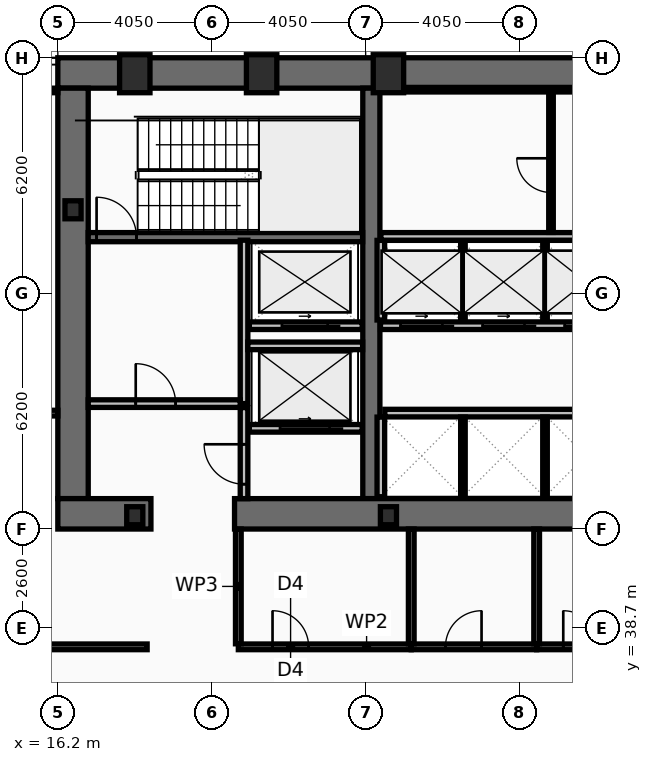
"""IFC4 building model, lengths in metres.
Left out: names, types, materials, properties, quantities, classifications, styles, units other than length and angle.
Written with IfcOpenShell. Run it as: python <this file> out.ifc"""

import sys

from ifc_helpers import new_model, si_unit, direction, frame, frame_2d, origin, origin_2d, place, context, subcontext, project, spatial, rectangle, hollow_rectangle, i_section, extrude, element, fill, save


model = new_model("IFC4")
c1 = context("Model", 3, precision=1e-05, world=origin(), true_north=direction((0.0, 1.0)))
c2 = subcontext(c1, "Body", "Model", "MODEL_VIEW")
j1 = project(units=[si_unit("LENGTHUNIT", "METRE"), si_unit("PLANEANGLEUNIT", "RADIAN")], contexts=[c1])
p1 = place(None, origin())
s1 = spatial("IfcSite", under=j1, at=p1, CompositionType="ELEMENT")
p2 = place(p1, origin())
s2 = spatial("IfcBuilding", under=s1, at=p2, CompositionType="ELEMENT")
p3 = place(p2, frame((0.0, 0.0, 53.8)))
s3 = spatial("IfcBuildingStorey", under=s2, at=p3, CompositionType="ELEMENT", Elevation=53.8)
p4 = place(p3, frame((16.2, 53.3, 0.0), z_axis=(0.0, 0.0, 1.0), x_axis=(1.0, 0.0, 0.0)))
e1 = element("IfcWall", 1, at=p4, inside=s3, PredefinedType="SHEAR", context=c2, shape_type="SweptSolid", body=[
    extrude(rectangle(XDim=40.5, YDim=0.8, at=frame_2d((20.25, 0.0))), origin(), (0.0, 0.0, 1.0), 3.82),
])
p5 = place(p3, frame((16.6, 42.1, 0.0), z_axis=(0.0, 0.0, 1.0), x_axis=(0.0, 1.0, 0.0)))
e2 = element("IfcWall", 2, at=p5, inside=s3, PredefinedType="SHEAR", context=c2, shape_type="SweptSolid", body=[
    extrude(rectangle(XDim=10.8, YDim=0.8, at=frame_2d((5.4, 0.0))), origin(), (0.0, 0.0, 1.0), 3.82),
])
p6 = place(p3, frame((24.45, 42.1, 0.0), z_axis=(0.0, 0.0, 1.0), x_axis=(0.0, 1.0, 0.0)))
e3 = element("IfcWall", 3, at=p6, inside=s3, PredefinedType="SHEAR", context=c2, shape_type="SweptSolid", body=[
    extrude(rectangle(XDim=10.8, YDim=0.45, at=frame_2d((5.4, 0.0))), origin(), (0.0, 0.0, 1.0), 3.82),
])
p7 = place(p3, frame((18.65, 41.7, 0.0), z_axis=(0.0, 0.0, 1.0), x_axis=(-1.0, 0.0, 0.0)))
e4 = element("IfcWall", 4, at=p7, inside=s3, PredefinedType="SHEAR", context=c2, shape_type="SweptSolid", body=[
    extrude(rectangle(XDim=2.45, YDim=0.8, at=frame_2d((1.225, 0.0))), origin(), (0.0, 0.0, 1.0), 3.82),
])
p8 = place(p3, frame((32.3, 41.7, 0.0), z_axis=(0.0, 0.0, 1.0), x_axis=(-1.0, 0.0, 0.0)))
e5 = element("IfcWall", 5, at=p8, inside=s3, PredefinedType="SHEAR", context=c2, shape_type="SweptSolid", body=[
    extrude(rectangle(XDim=11.45, YDim=0.8, at=frame_2d((5.725, 0.0))), origin(), (0.0, 0.0, 1.0), 3.82),
])
p9 = place(p3, frame((17.0, 48.98, 0.0), z_axis=(0.0, 0.0, 1.0), x_axis=(1.0, 0.0, 0.0)))
e6 = element("IfcWall", 6, at=p9, inside=s3, PredefinedType="SHEAR", context=c2, shape_type="SweptSolid", body=[
    extrude(rectangle(XDim=7.22, YDim=0.24, at=frame_2d((3.61, 0.0))), origin(), (0.0, 0.0, 1.0), 3.82),
])
p10 = place(p9, frame((0.22, 0.0, 0.0)))
e7 = element("IfcOpeningElement", 7, at=p10, cuts=e6, PredefinedType="OPENING", context=c2, shape_type="SweptSolid", body=[
    extrude(rectangle(XDim=1.05, YDim=2.15, at=frame_2d((0.525, 1.075))), frame((0.0, 0.13, 0.0), z_axis=(0.0, -1.0, 0.0), x_axis=(1.0, 0.0, 0.0)), (0.0, 0.0, 1.0), 0.26),
])
for number, where, z_axis, x_axis in (
    (8, (18.225, 53.28, 0.0), (0.0, 0.0, 1.0), (1.0, 0.0, 0.0)),
    (9, (21.562, 53.28, 0.0), (0.0, 0.0, 1.0), (1.0, 0.0, 0.0)),
    (10, (24.9, 53.28, 0.0), (0.0, 0.0, 1.0), (1.0, 0.0, 0.0)),
):
    element("IfcColumn", number, at=place(p3, frame(where, z_axis=z_axis, x_axis=x_axis)), inside=s3, PredefinedType="COLUMN", context=c2, shape_type="SweptSolid", body=[
        extrude(hollow_rectangle(XDim=0.8, YDim=1.0, WallThickness=0.055, at=origin_2d()), origin(), (0.0, 0.0, 1.0), 4.0),
    ])
for number, where, z_axis, x_axis in (
    (11, (16.6, 49.7, 0.0), (0.0, 0.0, 1.0), (1.0, 0.0, 0.0)),
    (12, (18.225, 41.65, 0.0), (0.0, 0.0, 1.0), (1.0, 0.0, 0.0)),
    (13, (24.9, 41.65, 0.0), (0.0, 0.0, 1.0), (1.0, 0.0, 0.0)),
):
    element("IfcColumn", number, at=place(p3, frame(where, z_axis=z_axis, x_axis=x_axis)), inside=s3, PredefinedType="COLUMN", context=c2, shape_type="SweptSolid", body=[
        extrude(i_section(OverallWidth=0.424, OverallDepth=0.474, WebThickness=0.048, FlangeThickness=0.077, at=origin_2d()), origin(), (0.0, 0.0, 1.0), 4.0),
    ])
p11 = place(p3, frame((24.21, 43.95, 0.0), z_axis=(0.0, 0.0, 1.0), x_axis=(-1.0, 0.0, 0.0)))
e14 = element("IfcWall", 14, at=p11, inside=s3, PredefinedType="PARTITIONING", context=c2, shape_type="SweptSolid", body=[
    extrude(rectangle(XDim=2.97, YDim=0.2, at=frame_2d((1.485, 0.0))), origin(), (0.0, 0.0, 1.0), 3.82),
])
p12 = place(p11, frame((0.86, 0.0, 0.0)))
e15 = element("IfcOpeningElement", 15, at=p12, cuts=e14, PredefinedType="OPENING", context=c2, shape_type="SweptSolid", body=[
    extrude(rectangle(XDim=1.3, YDim=2.18, at=frame_2d((0.65, 1.09))), frame((0.0, 0.11, 0.0), z_axis=(0.0, -1.0, 0.0), x_axis=(1.0, 0.0, 0.0)), (0.0, 0.0, 1.0), 0.22),
])
p13 = place(p3, frame((24.21, 46.65, 0.0), z_axis=(0.0, 0.0, 1.0), x_axis=(-1.0, 0.0, 0.0)))
e16 = element("IfcWall", 16, at=p13, inside=s3, PredefinedType="PARTITIONING", context=c2, shape_type="SweptSolid", body=[
    extrude(rectangle(XDim=2.97, YDim=0.2, at=frame_2d((1.485, 0.0))), origin(), (0.0, 0.0, 1.0), 3.82),
])
p14 = place(p13, frame((0.91, 0.0, 0.0)))
e17 = element("IfcOpeningElement", 17, at=p14, cuts=e16, PredefinedType="OPENING", context=c2, shape_type="SweptSolid", body=[
    extrude(rectangle(XDim=1.2, YDim=2.18, at=frame_2d((0.6, 1.09))), frame((0.0, 0.11, 0.0), z_axis=(0.0, -1.0, 0.0), x_axis=(1.0, 0.0, 0.0)), (0.0, 0.0, 1.0), 0.22),
])
p15 = place(p3, frame((31.22, 46.65, 0.0), z_axis=(0.0, 0.0, 1.0), x_axis=(-1.0, 0.0, 0.0)))
e18 = element("IfcWall", 18, at=p15, inside=s3, PredefinedType="PARTITIONING", context=c2, shape_type="SweptSolid", body=[
    extrude(rectangle(XDim=6.53, YDim=0.2, at=frame_2d((3.265, 0.0))), origin(), (0.0, 0.0, 1.0), 3.82),
])
p16 = place(p15, frame((4.9, 0.0, 0.0)))
e19 = element("IfcOpeningElement", 19, at=p16, cuts=e18, PredefinedType="OPENING", context=c2, shape_type="SweptSolid", body=[
    extrude(rectangle(XDim=1.1, YDim=2.18, at=frame_2d((0.55, 1.09))), frame((0.0, 0.11, 0.0), z_axis=(0.0, -1.0, 0.0), x_axis=(1.0, 0.0, 0.0)), (0.0, 0.0, 1.0), 0.22),
])
p17 = place(p15, frame((2.74, 0.0, 0.0)))
e20 = element("IfcOpeningElement", 20, at=p17, cuts=e18, PredefinedType="OPENING", context=c2, shape_type="SweptSolid", body=[
    extrude(rectangle(XDim=1.1, YDim=2.18, at=frame_2d((0.55, 1.09))), frame((0.0, 0.11, 0.0), z_axis=(0.0, -1.0, 0.0), x_axis=(1.0, 0.0, 0.0)), (0.0, 0.0, 1.0), 0.22),
])
p18 = place(p15, frame((0.58, 0.0, 0.0)))
e21 = element("IfcOpeningElement", 21, at=p18, cuts=e18, PredefinedType="OPENING", context=c2, shape_type="SweptSolid", body=[
    extrude(rectangle(XDim=1.1, YDim=2.18, at=frame_2d((0.55, 1.09))), frame((0.0, 0.11, 0.0), z_axis=(0.0, -1.0, 0.0), x_axis=(1.0, 0.0, 0.0)), (0.0, 0.0, 1.0), 0.22),
])
p19 = place(p3, frame((21.1, 44.6, 0.0), z_axis=(0.0, 0.0, 1.0), x_axis=(0.0, 1.0, 0.0)))
e22 = element("IfcWall", 22, at=p19, inside=s3, PredefinedType="PARTITIONING", context=c2, shape_type="SweptSolid", body=[
    extrude(rectangle(XDim=4.3, YDim=0.2, at=frame_2d((2.15, 0.0))), origin(), (0.0, 0.0, 1.0), 3.82),
])
p20 = place(p3, frame((17.0, 44.6, 0.0), z_axis=(0.0, 0.0, 1.0), x_axis=(1.0, 0.0, 0.0)))
e23 = element("IfcWall", 23, at=p20, inside=s3, PredefinedType="PARTITIONING", context=c2, shape_type="SweptSolid", body=[
    extrude(rectangle(XDim=4.0, YDim=0.2, at=frame_2d((2.0, 0.0))), origin(), (0.0, 0.0, 1.0), 3.82),
])
p21 = place(p20, frame((1.25, 0.0, 0.0)))
e24 = element("IfcOpeningElement", 24, at=p21, cuts=e23, PredefinedType="OPENING", context=c2, shape_type="SweptSolid", body=[
    extrude(rectangle(XDim=1.05, YDim=2.15, at=frame_2d((0.525, 1.075))), frame((0.0, 0.11, 0.0), z_axis=(0.0, -1.0, 0.0), x_axis=(1.0, 0.0, 0.0)), (0.0, 0.0, 1.0), 0.22),
])
p22 = place(p3, frame((21.2, 46.12, 0.0), z_axis=(0.0, 0.0, 1.0), x_axis=(1.0, 0.0, 0.0)))
e25 = element("IfcWall", 25, at=p22, inside=s3, PredefinedType="PARTITIONING", context=c2, shape_type="SweptSolid", body=[
    extrude(rectangle(XDim=3.02, YDim=0.2, at=frame_2d((1.51, 0.0))), origin(), (0.0, 0.0, 1.0), 3.82),
])
p23 = place(p3, frame((21.1, 42.1, 0.0), z_axis=(0.0, 0.0, 1.0), x_axis=(0.0, 1.0, 0.0)))
e26 = element("IfcWall", 26, at=p23, inside=s3, PredefinedType="PARTITIONING", context=c2, shape_type="SweptSolid", body=[
    extrude(rectangle(XDim=2.395, YDim=0.2, at=frame_2d((1.198, 0.0))), origin(), (0.0, 0.0, 1.0), 3.82),
])
p24 = place(p23, frame((0.38, 0.0, 0.0)))
e27 = element("IfcOpeningElement", 27, at=p24, cuts=e26, PredefinedType="OPENING", context=c2, shape_type="SweptSolid", body=[
    extrude(rectangle(XDim=1.05, YDim=2.15, at=frame_2d((0.525, 1.075))), frame((0.0, 0.11, 0.0), z_axis=(0.0, -1.0, 0.0), x_axis=(1.0, 0.0, 0.0)), (0.0, 0.0, 1.0), 0.22),
])
p25 = place(p3, frame((24.7, 46.8, 0.0), z_axis=(0.0, 0.0, 1.0), x_axis=(0.0, 1.0, 0.0)))
e28 = element("IfcWall", 28, at=p25, inside=s3, PredefinedType="PARTITIONING", context=c2, shape_type="SweptSolid", body=[
    extrude(rectangle(XDim=2.095, YDim=0.2, at=frame_2d((1.047, 0.0))), origin(), (0.0, 0.0, 1.0), 3.82),
])
for number, where, z_axis, x_axis in (
    (29, (26.86, 46.8, 0.0), (0.0, 0.0, 1.0), (0.0, 1.0, 0.0)),
    (30, (29.02, 46.8, 0.0), (0.0, 0.0, 1.0), (0.0, 1.0, 0.0)),
):
    element("IfcWall", number, at=place(p3, frame(where, z_axis=z_axis, x_axis=x_axis)), inside=s3, PredefinedType="PARTITIONING", context=c2, shape_type="SweptSolid", body=[
        extrude(rectangle(XDim=2.095, YDim=0.12, at=frame_2d((1.047, 0.0))), origin(), (0.0, 0.0, 1.0), 3.82),
    ])
p26 = place(p3, frame((24.805, 44.35, 0.0), z_axis=(0.0, 0.0, 1.0), x_axis=(1.0, 0.0, 0.0)))
e31 = element("IfcWall", 31, at=p26, inside=s3, PredefinedType="PARTITIONING", context=c2, shape_type="SweptSolid", body=[
    extrude(rectangle(XDim=6.27, YDim=0.2, at=frame_2d((3.135, 0.0))), origin(), (0.0, 0.0, 1.0), 3.82),
])
p27 = place(p3, frame((24.7, 42.15, 0.0), z_axis=(0.0, 0.0, 1.0), x_axis=(0.0, 1.0, 0.0)))
e32 = element("IfcWall", 32, at=p27, inside=s3, PredefinedType="PARTITIONING", context=c2, shape_type="SweptSolid", body=[
    extrude(rectangle(XDim=2.095, YDim=0.2, at=frame_2d((1.048, 0.0))), origin(), (0.0, 0.0, 1.0), 3.82),
])
for number, where, z_axis, x_axis in (
    (33, (26.86, 42.15, 0.0), (0.0, 0.0, 1.0), (0.0, 1.0, 0.0)),
    (34, (29.02, 42.15, 0.0), (0.0, 0.0, 1.0), (0.0, 1.0, 0.0)),
):
    element("IfcWall", number, at=place(p3, frame(where, z_axis=z_axis, x_axis=x_axis)), inside=s3, PredefinedType="PARTITIONING", context=c2, shape_type="SweptSolid", body=[
        extrude(rectangle(XDim=2.095, YDim=0.12, at=frame_2d((1.048, 0.0))), origin(), (0.0, 0.0, 1.0), 3.82),
    ])
p28 = place(p3, frame((24.7, 52.86, 0.0), z_axis=(0.0, 0.0, 1.0), x_axis=(1.0, 0.0, 0.0)))
e35 = element("IfcWall", 35, at=p28, inside=s3, PredefinedType="PARTITIONING", context=c2, shape_type="SweptSolid", body=[
    extrude(rectangle(XDim=7.72, YDim=0.12, at=frame_2d((3.86, 0.0))), origin(), (0.0, 0.0, 1.0), 3.82),
])
p29 = place(p3, frame((24.7, 49.0, 0.0), z_axis=(0.0, 0.0, 1.0), x_axis=(1.0, 0.0, 0.0)))
e36 = element("IfcWall", 36, at=p29, inside=s3, PredefinedType="PARTITIONING", context=c2, shape_type="SweptSolid", body=[
    extrude(rectangle(XDim=7.72, YDim=0.2, at=frame_2d((3.86, 0.0))), origin(), (0.0, 0.0, 1.0), 3.82),
])
p30 = place(p29, frame((6.56, 0.0, 0.0)))
e37 = element("IfcOpeningElement", 37, at=p30, cuts=e36, PredefinedType="OPENING", context=c2, shape_type="SweptSolid", body=[
    extrude(rectangle(XDim=0.95, YDim=2.1, at=frame_2d((0.475, 1.05))), frame((0.0, 0.11, 0.0), z_axis=(0.0, -1.0, 0.0), x_axis=(1.0, 0.0, 0.0)), (0.0, 0.0, 1.0), 0.22),
])
p31 = place(p3, frame((29.177, 49.105, 0.0), z_axis=(0.0, 0.0, 1.0), x_axis=(0.0, 1.0, 0.0)))
e38 = element("IfcWall", 38, at=p31, inside=s3, PredefinedType="PARTITIONING", context=c2, shape_type="SweptSolid", body=[
    extrude(rectangle(XDim=3.69, YDim=0.12, at=frame_2d((1.845, 0.0))), origin(), (0.0, 0.0, 1.0), 3.82),
])
p32 = place(p31, frame((1.05, 0.0, 0.0)))
e39 = element("IfcOpeningElement", 39, at=p32, cuts=e38, PredefinedType="OPENING", context=c2, shape_type="SweptSolid", body=[
    extrude(rectangle(XDim=0.9, YDim=2.05, at=frame_2d((0.45, 1.025))), frame((0.0, 0.07, 0.0), z_axis=(0.0, -1.0, 0.0), x_axis=(1.0, 0.0, 0.0)), (0.0, 0.0, 1.0), 0.14),
])
p33 = place(p3, frame((20.95, 38.2, 0.0), z_axis=(0.0, 0.0, 1.0), x_axis=(1.0, 0.0, 0.0)))
e40 = element("IfcWall", 40, at=p33, inside=s3, PredefinedType="PARTITIONING", context=c2, shape_type="SweptSolid", body=[
    extrude(rectangle(XDim=4.55, YDim=0.15, at=frame_2d((2.275, 0.0))), origin(), (0.0, 0.0, 1.0), 3.01),
])
p34 = place(p33, frame((0.9, 0.0, 0.0)))
e41 = element("IfcOpeningElement", 41, at=p34, cuts=e40, PredefinedType="OPENING", context=c2, shape_type="SweptSolid", body=[
    extrude(rectangle(XDim=0.95, YDim=2.05, at=frame_2d((0.475, 1.025))), frame((0.0, 0.085, 0.0), z_axis=(0.0, -1.0, 0.0), x_axis=(1.0, 0.0, 0.0)), (0.0, 0.0, 1.0), 0.17),
])
p35 = place(p3, frame((25.5, 38.2, 0.0), z_axis=(0.0, 0.0, 1.0), x_axis=(1.0, 0.0, 0.0)))
e42 = element("IfcWall", 42, at=p35, inside=s3, PredefinedType="PARTITIONING", context=c2, shape_type="SweptSolid", body=[
    extrude(rectangle(XDim=3.3, YDim=0.15, at=frame_2d((1.65, 0.0))), origin(), (0.0, 0.0, 1.0), 3.82),
])
p36 = place(p35, frame((0.9, 0.0, 0.0)))
e43 = element("IfcOpeningElement", 43, at=p36, cuts=e42, PredefinedType="OPENING", context=c2, shape_type="SweptSolid", body=[
    extrude(rectangle(XDim=0.95, YDim=2.05, at=frame_2d((0.475, 1.025))), frame((0.0, 0.085, 0.0), z_axis=(0.0, -1.0, 0.0), x_axis=(1.0, 0.0, 0.0)), (0.0, 0.0, 1.0), 0.17),
])
p37 = place(p3, frame((28.8, 38.2, 0.0), z_axis=(0.0, 0.0, 1.0), x_axis=(1.0, 0.0, 0.0)))
e44 = element("IfcWall", 44, at=p37, inside=s3, PredefinedType="PARTITIONING", context=c2, shape_type="SweptSolid", body=[
    extrude(rectangle(XDim=3.38, YDim=0.15, at=frame_2d((1.69, 0.0))), origin(), (0.0, 0.0, 1.0), 3.01),
])
p38 = place(p37, frame((0.7, 0.0, 0.0)))
e45 = element("IfcOpeningElement", 45, at=p38, cuts=e44, PredefinedType="OPENING", context=c2, shape_type="SweptSolid", body=[
    extrude(rectangle(XDim=0.95, YDim=2.05, at=frame_2d((0.475, 1.025))), frame((0.0, 0.085, 0.0), z_axis=(0.0, -1.0, 0.0), x_axis=(1.0, 0.0, 0.0)), (0.0, 0.0, 1.0), 0.17),
])
for number, where, z_axis, x_axis in (
    (46, (20.95, 38.28, 0.0), (0.0, 0.0, 1.0), (0.0, 1.0, 0.0)),
    (47, (25.5, 38.28, 0.0), (0.0, 0.0, 1.0), (0.0, 1.0, 0.0)),
    (48, (28.8, 38.28, 0.0), (0.0, 0.0, 1.0), (0.0, 1.0, 0.0)),
):
    element("IfcWall", number, at=place(p3, frame(where, z_axis=z_axis, x_axis=x_axis)), inside=s3, PredefinedType="PARTITIONING", context=c2, shape_type="SweptSolid", body=[
        extrude(rectangle(XDim=3.02, YDim=0.15, at=frame_2d((1.51, 0.0))), origin(), (0.0, 0.0, 1.0), 3.82),
    ])
p39 = place(p3, frame((2.03, 38.2, 0.0), z_axis=(0.0, 0.0, 1.0), x_axis=(1.0, 0.0, 0.0)))
e49 = element("IfcWall", 49, at=p39, inside=s3, PredefinedType="PARTITIONING", context=c2, shape_type="SweptSolid", body=[
    extrude(rectangle(XDim=16.52, YDim=0.15, at=frame_2d((8.26, 0.0))), origin(), (0.0, 0.0, 1.0), 3.01),
])
p40 = place(p39, frame((12.32, 0.0, 0.0)))
e50 = element("IfcOpeningElement", 50, at=p40, cuts=e49, PredefinedType="OPENING", context=c2, shape_type="SweptSolid", body=[
    extrude(rectangle(XDim=0.95, YDim=2.05, at=frame_2d((0.475, 1.025))), frame((0.0, 0.085, 0.0), z_axis=(0.0, -1.0, 0.0), x_axis=(1.0, 0.0, 0.0)), (0.0, 0.0, 1.0), 0.17),
])
p41 = place(p3, frame((2.095, 44.35, 0.0), z_axis=(0.0, 0.0, 1.0), x_axis=(1.0, 0.0, 0.0)))
e51 = element("IfcWall", 51, at=p41, inside=s3, PredefinedType="PARTITIONING", context=c2, shape_type="SweptSolid", body=[
    extrude(rectangle(XDim=14.105, YDim=0.15, at=frame_2d((7.052, 0.0))), origin(), (0.0, 0.0, 1.0), 3.16),
])
p42 = place(p41, frame((12.32, 0.0, 0.0)))
e52 = element("IfcOpeningElement", 52, at=p42, cuts=e51, PredefinedType="OPENING", context=c2, shape_type="SweptSolid", body=[
    extrude(rectangle(XDim=0.9, YDim=2.05, at=frame_2d((0.45, 1.025))), frame((0.0, 0.085, 0.0), z_axis=(0.0, -1.0, 0.0), x_axis=(1.0, 0.0, 0.0)), (0.0, 0.0, 1.0), 0.17),
])
p43 = place(p3, frame((2.095, 52.84, 0.0), z_axis=(0.0, 0.0, 1.0), x_axis=(1.0, 0.0, 0.0)))
e53 = element("IfcWall", 53, at=p43, inside=s3, PredefinedType="PARTITIONING", context=c2, shape_type="SweptSolid", body=[
    extrude(rectangle(XDim=14.105, YDim=0.12, at=frame_2d((7.052, 0.0))), origin(), (0.0, 0.0, 1.0), 3.82),
])
p44 = place(p10, origin())
e54 = element("IfcDoor", 54, at=p44, inside=s3, OperationType="SINGLE_SWING_LEFT", PredefinedType="DOOR", context=c2, shape_type="SweptSolid", body=[
    extrude(rectangle(XDim=1.05, YDim=2.15, at=frame_2d((0.525, 1.075))), frame((0.0, 0.025, 0.0), z_axis=(0.0, -1.0, 0.0), x_axis=(1.0, 0.0, 0.0)), (0.0, 0.0, 1.0), 0.05),
])
fill(e7, e54)
p45 = place(p12, origin())
e55 = element("IfcDoor", 55, at=p45, inside=s3, OperationType="SLIDING_TO_LEFT", PredefinedType="DOOR", context=c2, shape_type="SweptSolid", body=[
    extrude(rectangle(XDim=1.3, YDim=2.18, at=frame_2d((0.65, 1.09))), frame((0.0, 0.025, 0.0), z_axis=(0.0, -1.0, 0.0), x_axis=(1.0, 0.0, 0.0)), (0.0, 0.0, 1.0), 0.05),
])
fill(e15, e55)
p46 = place(p14, origin())
e56 = element("IfcDoor", 56, at=p46, inside=s3, OperationType="SLIDING_TO_LEFT", PredefinedType="DOOR", context=c2, shape_type="SweptSolid", body=[
    extrude(rectangle(XDim=1.2, YDim=2.18, at=frame_2d((0.6, 1.09))), frame((0.0, 0.025, 0.0), z_axis=(0.0, -1.0, 0.0), x_axis=(1.0, 0.0, 0.0)), (0.0, 0.0, 1.0), 0.05),
])
fill(e17, e56)
p47 = place(p16, origin())
e57 = element("IfcDoor", 57, at=p47, inside=s3, OperationType="SLIDING_TO_LEFT", PredefinedType="DOOR", context=c2, shape_type="SweptSolid", body=[
    extrude(rectangle(XDim=1.1, YDim=2.18, at=frame_2d((0.55, 1.09))), frame((0.0, 0.025, 0.0), z_axis=(0.0, -1.0, 0.0), x_axis=(1.0, 0.0, 0.0)), (0.0, 0.0, 1.0), 0.05),
])
fill(e19, e57)
p48 = place(p17, origin())
e58 = element("IfcDoor", 58, at=p48, inside=s3, OperationType="SLIDING_TO_LEFT", PredefinedType="DOOR", context=c2, shape_type="SweptSolid", body=[
    extrude(rectangle(XDim=1.1, YDim=2.18, at=frame_2d((0.55, 1.09))), frame((0.0, 0.025, 0.0), z_axis=(0.0, -1.0, 0.0), x_axis=(1.0, 0.0, 0.0)), (0.0, 0.0, 1.0), 0.05),
])
fill(e20, e58)
p49 = place(p18, origin())
e59 = element("IfcDoor", 59, at=p49, inside=s3, OperationType="SLIDING_TO_LEFT", PredefinedType="DOOR", context=c2, shape_type="SweptSolid", body=[
    extrude(rectangle(XDim=1.1, YDim=2.18, at=frame_2d((0.55, 1.09))), frame((0.0, 0.025, 0.0), z_axis=(0.0, -1.0, 0.0), x_axis=(1.0, 0.0, 0.0)), (0.0, 0.0, 1.0), 0.05),
])
fill(e21, e59)
p50 = place(p21, origin())
e60 = element("IfcDoor", 60, at=p50, inside=s3, OperationType="SINGLE_SWING_LEFT", PredefinedType="DOOR", context=c2, shape_type="SweptSolid", body=[
    extrude(rectangle(XDim=1.05, YDim=2.15, at=frame_2d((0.525, 1.075))), frame((0.0, 0.025, 0.0), z_axis=(0.0, -1.0, 0.0), x_axis=(1.0, 0.0, 0.0)), (0.0, 0.0, 1.0), 0.05),
])
fill(e24, e60)
p51 = place(p24, origin())
e61 = element("IfcDoor", 61, at=p51, inside=s3, OperationType="SINGLE_SWING_RIGHT", PredefinedType="DOOR", context=c2, shape_type="SweptSolid", body=[
    extrude(rectangle(XDim=1.05, YDim=2.15, at=frame_2d((0.525, 1.075))), frame((0.0, 0.025, 0.0), z_axis=(0.0, -1.0, 0.0), x_axis=(1.0, 0.0, 0.0)), (0.0, 0.0, 1.0), 0.05),
])
fill(e27, e61)
p52 = place(p32, origin())
e62 = element("IfcDoor", 62, at=p52, inside=s3, OperationType="SINGLE_SWING_RIGHT", PredefinedType="DOOR", context=c2, shape_type="SweptSolid", body=[
    extrude(rectangle(XDim=0.9, YDim=2.05, at=frame_2d((0.45, 1.025))), frame((0.0, 0.025, 0.0), z_axis=(0.0, -1.0, 0.0), x_axis=(1.0, 0.0, 0.0)), (0.0, 0.0, 1.0), 0.05),
])
fill(e39, e62)
p53 = place(p34, origin())
e63 = element("IfcDoor", 63, at=p53, inside=s3, OperationType="SINGLE_SWING_LEFT", PredefinedType="DOOR", context=c2, shape_type="SweptSolid", body=[
    extrude(rectangle(XDim=0.95, YDim=2.05, at=frame_2d((0.475, 1.025))), frame((0.0, 0.025, 0.0), z_axis=(0.0, -1.0, 0.0), x_axis=(1.0, 0.0, 0.0)), (0.0, 0.0, 1.0), 0.05),
])
fill(e41, e63)
p54 = place(p36, origin())
e64 = element("IfcDoor", 64, at=p54, inside=s3, OperationType="SINGLE_SWING_RIGHT", PredefinedType="DOOR", context=c2, shape_type="SweptSolid", body=[
    extrude(rectangle(XDim=0.95, YDim=2.05, at=frame_2d((0.475, 1.025))), frame((0.0, 0.025, 0.0), z_axis=(0.0, -1.0, 0.0), x_axis=(1.0, 0.0, 0.0)), (0.0, 0.0, 1.0), 0.05),
])
fill(e43, e64)
p55 = place(p38, origin())
e65 = element("IfcDoor", 65, at=p55, inside=s3, OperationType="SINGLE_SWING_LEFT", PredefinedType="DOOR", context=c2, shape_type="SweptSolid", body=[
    extrude(rectangle(XDim=0.95, YDim=2.05, at=frame_2d((0.475, 1.025))), frame((0.0, 0.025, 0.0), z_axis=(0.0, -1.0, 0.0), x_axis=(1.0, 0.0, 0.0)), (0.0, 0.0, 1.0), 0.05),
])
fill(e45, e65)
save(model, sys.argv[1])
